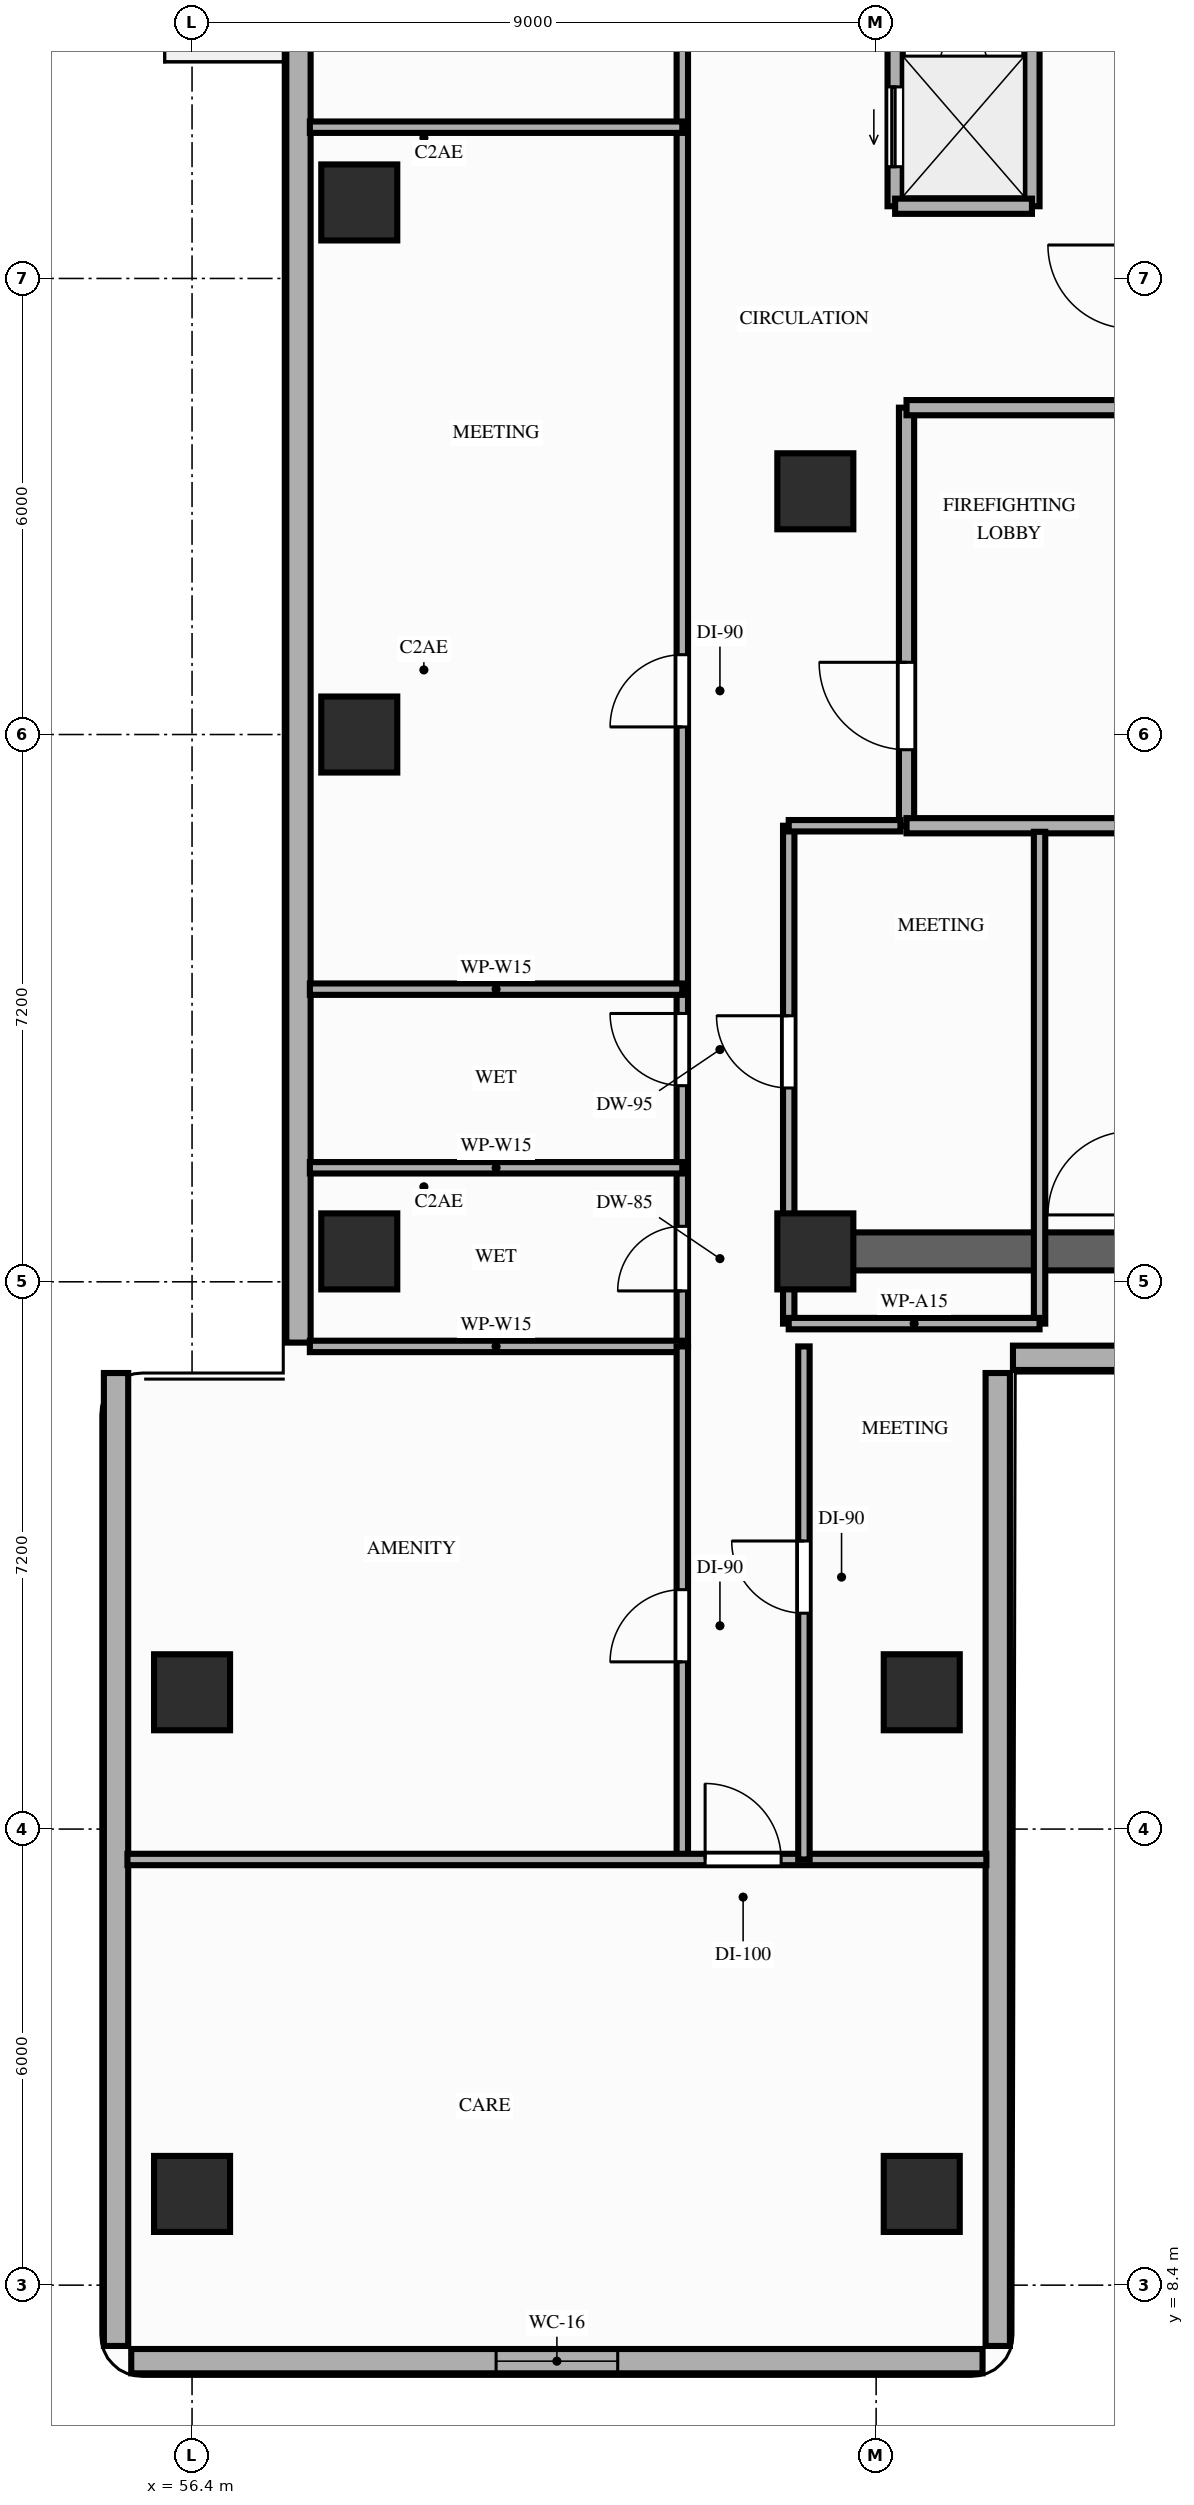
"""IFC4 building model, lengths in metres.
Left out: names, types, materials, properties, quantities, classifications, styles, units other than length and angle.
Written with IfcOpenShell. Run it as: python <this file> out.ifc"""

import sys

from ifc_helpers import new_model, si_unit, direction, frame, frame_2d, origin, origin_2d, place, context, subcontext, project, spatial, rectangle, extrude, element, fill, save


model = new_model("IFC4")
c1 = context("Model", 3, precision=1e-05, world=origin(), true_north=direction((0.0, 1.0)))
c2 = subcontext(c1, "Body", "Model", "MODEL_VIEW")
j1 = project(units=[si_unit("LENGTHUNIT", "METRE"), si_unit("PLANEANGLEUNIT", "RADIAN")], contexts=[c1])
p1 = place(None, origin())
s1 = spatial("IfcSite", under=j1, at=p1, CompositionType="ELEMENT")
p2 = place(p1, origin())
s2 = spatial("IfcBuilding", under=s1, at=p2, CompositionType="ELEMENT")
p3 = place(p2, frame((0.0, 0.0, 30.2)))
s3 = spatial("IfcBuildingStorey", under=s2, at=p3, CompositionType="ELEMENT", Elevation=30.2)
for number, where, z_axis, x_axis in (
    (1, (64.6, 22.0, 0.0), (0.0, 0.0, 1.0), (1.0, 0.0, 0.0)),
    (2, (64.6, 32.0, 0.0), (0.0, 0.0, 1.0), (1.0, 0.0, 0.0)),
    (3, (58.6, 22.0, 0.0), (0.0, 0.0, 1.0), (1.0, 0.0, 0.0)),
    (4, (58.6, 28.8, 0.0), (0.0, 0.0, 1.0), (1.0, 0.0, 0.0)),
    (5, (58.6, 35.8, 0.0), (0.0, 0.0, 1.0), (1.0, 0.0, 0.0)),
    (6, (56.4, 9.6, 0.0), (0.0, 0.0, 1.0), (1.0, 0.0, 0.0)),
    (7, (56.4, 16.2, 0.0), (0.0, 0.0, 1.0), (1.0, 0.0, 0.0)),
    (8, (66.0, 9.6, 0.0), (0.0, 0.0, 1.0), (1.0, 0.0, 0.0)),
    (9, (66.0, 16.2, 0.0), (0.0, 0.0, 1.0), (1.0, 0.0, 0.0)),
):
    element("IfcColumn", number, at=place(p3, frame(where, z_axis=z_axis, x_axis=x_axis)), inside=s3, PredefinedType="COLUMN", context=c2, shape_type="SweptSolid", body=[
        extrude(rectangle(XDim=1.0, YDim=1.0, at=origin_2d()), origin(), (0.0, 0.0, 1.0), 3.2),
    ])
p4 = place(p3, frame((57.8, 43.4, 0.0), z_axis=(0.0, 0.0, 1.0), x_axis=(0.0, -1.0, 0.0)))
e10 = element("IfcWall", 10, at=p4, inside=s3, PredefinedType="STANDARD", context=c2, shape_type="SweptSolid", body=[
    extrude(rectangle(XDim=22.6, YDim=0.32, at=frame_2d((11.3, 0.0))), origin(), (0.0, 0.0, 1.0), 2.5),
])
p5 = place(p4, frame((3.7, 0.0, 0.0)))
e11 = element("IfcOpeningElement", 11, at=p5, cuts=e10, PredefinedType="OPENING", context=c2, shape_type="SweptSolid", body=[
    extrude(rectangle(XDim=1.4, YDim=2.1, at=frame_2d((0.7, 1.05))), frame((0.0, 0.17, 0.0), z_axis=(0.0, -1.0, 0.0), x_axis=(1.0, 0.0, 0.0)), (0.0, 0.0, 1.0), 0.34),
])
p6 = place(p3, frame((55.6, 7.4, 0.0), z_axis=(0.0, 0.0, 1.0), x_axis=(1.0, 0.0, 0.0)))
e12 = element("IfcWall", 12, at=p6, inside=s3, PredefinedType="STANDARD", context=c2, shape_type="SweptSolid", body=[
    extrude(rectangle(XDim=11.2, YDim=0.32, at=frame_2d((5.6, 0.0))), origin(), (0.0, 0.0, 1.0), 3.02),
])
p7 = place(p6, frame((4.8, 0.0, 0.85)))
e13 = element("IfcOpeningElement", 13, at=p7, cuts=e12, PredefinedType="OPENING", context=c2, shape_type="SweptSolid", body=[
    extrude(rectangle(XDim=1.6, YDim=1.7, at=frame_2d((0.8, 0.85))), frame((0.0, 0.17, 0.0), z_axis=(0.0, -1.0, 0.0), x_axis=(1.0, 0.0, 0.0)), (0.0, 0.0, 1.0), 0.34),
])
for number, where, z_axis, x_axis in (
    (14, (55.4, 20.4, 0.0), (0.0, 0.0, 1.0), (0.0, -1.0, 0.0)),
    (15, (67.0, 7.6, 0.0), (0.0, 0.0, 1.0), (0.0, 1.0, 0.0)),
):
    element("IfcWall", number, at=place(p3, frame(where, z_axis=z_axis, x_axis=x_axis)), inside=s3, PredefinedType="STANDARD", context=c2, shape_type="SweptSolid", body=[
        extrude(rectangle(XDim=12.8, YDim=0.32, at=frame_2d((6.4, 0.0))), origin(), (0.0, 0.0, 1.0), 3.02),
    ])
p8 = place(p3, frame((67.2, 20.6, 0.0), z_axis=(0.0, 0.0, 1.0), x_axis=(1.0, 0.0, 0.0)))
e16 = element("IfcWall", 16, at=p8, inside=s3, PredefinedType="STANDARD", context=c2, shape_type="SweptSolid", body=[
    extrude(rectangle(XDim=5.6, YDim=0.32, at=frame_2d((2.8, 0.0))), origin(), (0.0, 0.0, 1.0), 3.02),
])
p9 = place(p3, frame((64.6, 22.0, 0.0), z_axis=(0.0, 0.0, 1.0), x_axis=(1.0, 0.0, 0.0)))
e17 = element("IfcWall", 17, at=p9, inside=s3, PredefinedType="SHEAR", context=c2, shape_type="SweptSolid", body=[
    extrude(rectangle(XDim=7.5, YDim=0.5, at=frame_2d((3.75, 0.0))), origin(), (0.0, 0.0, 1.0), 3.02),
])
p10 = place(p3, frame((65.65, 35.75, 0.0), z_axis=(0.0, 0.0, 1.0), x_axis=(0.0, 1.0, 0.0)))
e18 = element("IfcWall", 18, at=p10, inside=s3, PredefinedType="MOVABLE", context=c2, shape_type="SweptSolid", body=[
    extrude(rectangle(XDim=6.05, YDim=0.2, at=frame_2d((3.025, 0.0))), origin(), (0.0, 0.0, 1.0), 3.02),
])
p11 = place(p10, frame((0.52, 0.0, 0.0)))
e19 = element("IfcOpeningElement", 19, at=p11, cuts=e18, PredefinedType="OPENING", context=c2, shape_type="SweptSolid", body=[
    extrude(rectangle(XDim=1.05, YDim=2.15, at=frame_2d((0.525, 1.075))), frame((0.0, 0.11, 0.0), z_axis=(0.0, -1.0, 0.0), x_axis=(1.0, 0.0, 0.0)), (0.0, 0.0, 1.0), 0.22),
])
p12 = place(p10, frame((2.48, 0.0, 0.0)))
e20 = element("IfcOpeningElement", 20, at=p12, cuts=e18, PredefinedType="OPENING", context=c2, shape_type="SweptSolid", body=[
    extrude(rectangle(XDim=1.05, YDim=2.15, at=frame_2d((0.525, 1.075))), frame((0.0, 0.11, 0.0), z_axis=(0.0, -1.0, 0.0), x_axis=(1.0, 0.0, 0.0)), (0.0, 0.0, 1.0), 0.22),
])
p13 = place(p10, frame((4.43, 0.0, 0.0)))
e21 = element("IfcOpeningElement", 21, at=p13, cuts=e18, PredefinedType="OPENING", context=c2, shape_type="SweptSolid", body=[
    extrude(rectangle(XDim=1.05, YDim=2.15, at=frame_2d((0.525, 1.075))), frame((0.0, 0.11, 0.0), z_axis=(0.0, -1.0, 0.0), x_axis=(1.0, 0.0, 0.0)), (0.0, 0.0, 1.0), 0.22),
])
p14 = place(p3, frame((67.45, 35.75, 0.0), z_axis=(0.0, 0.0, 1.0), x_axis=(0.0, 1.0, 0.0)))
e22 = element("IfcWall", 22, at=p14, inside=s3, PredefinedType="MOVABLE", context=c2, shape_type="SweptSolid", body=[
    extrude(rectangle(XDim=6.05, YDim=0.2, at=frame_2d((3.025, 0.0))), origin(), (0.0, 0.0, 1.0), 3.02),
])
p15 = place(p3, frame((65.65, 35.75, 0.0), z_axis=(0.0, 0.0, 1.0), x_axis=(1.0, 0.0, 0.0)))
e23 = element("IfcWall", 23, at=p15, inside=s3, PredefinedType="MOVABLE", context=c2, shape_type="SweptSolid", body=[
    extrude(rectangle(XDim=1.8, YDim=0.2, at=frame_2d((0.9, 0.0))), origin(), (0.0, 0.0, 1.0), 3.02),
])
p16 = place(p3, frame((65.8, 27.6, 0.0), z_axis=(0.0, 0.0, 1.0), x_axis=(0.0, 1.0, 0.0)))
e24 = element("IfcWall", 24, at=p16, inside=s3, PredefinedType="PARTITIONING", context=c2, shape_type="SweptSolid", body=[
    extrude(rectangle(XDim=5.5, YDim=0.2, at=frame_2d((2.75, 0.0))), origin(), (0.0, 0.0, 1.0), 3.02),
])
p17 = place(p16, frame((1.0, 0.0, 0.0)))
e25 = element("IfcOpeningElement", 25, at=p17, cuts=e24, PredefinedType="OPENING", context=c2, shape_type="SweptSolid", body=[
    extrude(rectangle(XDim=1.15, YDim=2.15, at=frame_2d((0.575, 1.075))), frame((0.0, 0.11, 0.0), z_axis=(0.0, -1.0, 0.0), x_axis=(1.0, 0.0, 0.0)), (0.0, 0.0, 1.0), 0.22),
])
p18 = place(p3, frame((65.8, 33.1, 0.0), z_axis=(0.0, 0.0, 1.0), x_axis=(1.0, 0.0, 0.0)))
e26 = element("IfcWall", 26, at=p18, inside=s3, PredefinedType="PARTITIONING", context=c2, shape_type="SweptSolid", body=[
    extrude(rectangle(XDim=3.6, YDim=0.2, at=frame_2d((1.8, 0.0))), origin(), (0.0, 0.0, 1.0), 3.02),
])
p19 = place(p3, frame((65.8, 27.6, 0.0), z_axis=(0.0, 0.0, 1.0), x_axis=(1.0, 0.0, 0.0)))
e27 = element("IfcWall", 27, at=p19, inside=s3, PredefinedType="PARTITIONING", context=c2, shape_type="SweptSolid", body=[
    extrude(rectangle(XDim=3.4, YDim=0.2, at=frame_2d((1.7, 0.0))), origin(), (0.0, 0.0, 1.0), 3.02),
])
p20 = place(p3, frame((64.25, 21.05, 0.0), z_axis=(0.0, 0.0, 1.0), x_axis=(0.0, 1.0, 0.0)))
e28 = element("IfcWall", 28, at=p20, inside=s3, PredefinedType="PARTITIONING", context=c2, shape_type="SweptSolid", body=[
    extrude(rectangle(XDim=6.55, YDim=0.15, at=frame_2d((3.275, 0.0))), origin(), (0.0, 0.0, 1.0), 2.5),
])
p21 = place(p20, frame((3.1, 0.0, 0.0)))
e29 = element("IfcOpeningElement", 29, at=p21, cuts=e28, PredefinedType="OPENING", context=c2, shape_type="SweptSolid", body=[
    extrude(rectangle(XDim=0.95, YDim=2.15, at=frame_2d((0.475, 1.075))), frame((0.0, 0.085, 0.0), z_axis=(0.0, -1.0, 0.0), x_axis=(1.0, 0.0, 0.0)), (0.0, 0.0, 1.0), 0.17),
])
p22 = place(p3, frame((67.55, 21.05, 0.0), z_axis=(0.0, 0.0, 1.0), x_axis=(0.0, 1.0, 0.0)))
e30 = element("IfcWall", 30, at=p22, inside=s3, PredefinedType="PARTITIONING", context=c2, shape_type="SweptSolid", body=[
    extrude(rectangle(XDim=6.47, YDim=0.15, at=frame_2d((3.235, 0.0))), origin(), (0.0, 0.0, 1.0), 2.5),
])
p23 = place(p3, frame((64.25, 21.05, 0.0), z_axis=(0.0, 0.0, 1.0), x_axis=(1.0, 0.0, 0.0)))
e31 = element("IfcWall", 31, at=p23, inside=s3, PredefinedType="PARTITIONING", context=c2, shape_type="SweptSolid", body=[
    extrude(rectangle(XDim=3.3, YDim=0.15, at=frame_2d((1.65, 0.0))), origin(), (0.0, 0.0, 1.0), 2.5),
])
p24 = place(p3, frame((64.25, 27.6, 0.0), z_axis=(0.0, 0.0, 1.0), x_axis=(1.0, 0.0, 0.0)))
e32 = element("IfcWall", 32, at=p24, inside=s3, PredefinedType="PARTITIONING", context=c2, shape_type="SweptSolid", body=[
    extrude(rectangle(XDim=1.47, YDim=0.15, at=frame_2d((0.735, 0.0))), origin(), (0.0, 0.0, 1.0), 2.5),
])
p25 = place(p3, frame((62.85, 20.75, 0.0), z_axis=(0.0, 0.0, 1.0), x_axis=(0.0, 1.0, 0.0)))
e33 = element("IfcWall", 33, at=p25, inside=s3, PredefinedType="PARTITIONING", context=c2, shape_type="SweptSolid", body=[
    extrude(rectangle(XDim=22.7, YDim=0.15, at=frame_2d((11.35, 0.0))), origin(), (0.0, 0.0, 1.0), 2.5),
])
p26 = place(p25, frame((0.73, 0.0, 0.0)))
e34 = element("IfcOpeningElement", 34, at=p26, cuts=e33, PredefinedType="OPENING", context=c2, shape_type="SweptSolid", body=[
    extrude(rectangle(XDim=0.85, YDim=2.1, at=frame_2d((0.425, 1.05))), frame((0.0, 0.085, 0.0), z_axis=(0.0, -1.0, 0.0), x_axis=(1.0, 0.0, 0.0)), (0.0, 0.0, 1.0), 0.17),
])
p27 = place(p25, frame((3.43, 0.0, 0.0)))
e35 = element("IfcOpeningElement", 35, at=p27, cuts=e33, PredefinedType="OPENING", context=c2, shape_type="SweptSolid", body=[
    extrude(rectangle(XDim=0.95, YDim=2.1, at=frame_2d((0.475, 1.05))), frame((0.0, 0.085, 0.0), z_axis=(0.0, -1.0, 0.0), x_axis=(1.0, 0.0, 0.0)), (0.0, 0.0, 1.0), 0.17),
])
p28 = place(p25, frame((8.15, 0.0, 0.0)))
e36 = element("IfcOpeningElement", 36, at=p28, cuts=e33, PredefinedType="OPENING", context=c2, shape_type="SweptSolid", body=[
    extrude(rectangle(XDim=0.95, YDim=2.15, at=frame_2d((0.475, 1.075))), frame((0.0, 0.085, 0.0), z_axis=(0.0, -1.0, 0.0), x_axis=(1.0, 0.0, 0.0)), (0.0, 0.0, 1.0), 0.17),
])
p29 = place(p25, frame((18.89, 0.0, 0.0)))
e37 = element("IfcOpeningElement", 37, at=p29, cuts=e33, PredefinedType="OPENING", context=c2, shape_type="SweptSolid", body=[
    extrude(rectangle(XDim=0.95, YDim=2.15, at=frame_2d((0.475, 1.075))), frame((0.0, 0.085, 0.0), z_axis=(0.0, -1.0, 0.0), x_axis=(1.0, 0.0, 0.0)), (0.0, 0.0, 1.0), 0.17),
])
for number, where, z_axis, x_axis in (
    (38, (57.95, 20.75, 0.0), (0.0, 0.0, 1.0), (1.0, 0.0, 0.0)),
    (39, (57.95, 23.1, 0.0), (0.0, 0.0, 1.0), (1.0, 0.0, 0.0)),
    (40, (57.95, 25.45, 0.0), (0.0, 0.0, 1.0), (1.0, 0.0, 0.0)),
    (41, (57.95, 36.79, 0.0), (0.0, 0.0, 1.0), (1.0, 0.0, 0.0)),
):
    element("IfcWall", number, at=place(p3, frame(where, z_axis=z_axis, x_axis=x_axis)), inside=s3, PredefinedType="PARTITIONING", context=c2, shape_type="SweptSolid", body=[
        extrude(rectangle(XDim=4.9, YDim=0.15, at=frame_2d((2.45, 0.0))), origin(), (0.0, 0.0, 1.0), 2.5),
    ])
p30 = place(p3, frame((62.85, 14.0, 0.0), z_axis=(0.0, 0.0, 1.0), x_axis=(0.0, 1.0, 0.0)))
e42 = element("IfcWall", 42, at=p30, inside=s3, PredefinedType="PARTITIONING", context=c2, shape_type="SweptSolid", body=[
    extrude(rectangle(XDim=6.75, YDim=0.15, at=frame_2d((3.375, 0.0))), origin(), (0.0, 0.0, 1.0), 2.5),
])
p31 = place(p30, frame((2.6, 0.0, 0.0)))
e43 = element("IfcOpeningElement", 43, at=p31, cuts=e42, PredefinedType="OPENING", context=c2, shape_type="SweptSolid", body=[
    extrude(rectangle(XDim=0.95, YDim=2.15, at=frame_2d((0.475, 1.075))), frame((0.0, 0.085, 0.0), z_axis=(0.0, -1.0, 0.0), x_axis=(1.0, 0.0, 0.0)), (0.0, 0.0, 1.0), 0.17),
])
p32 = place(p3, frame((55.55, 14.0, 0.0), z_axis=(0.0, 0.0, 1.0), x_axis=(1.0, 0.0, 0.0)))
e44 = element("IfcWall", 44, at=p32, inside=s3, PredefinedType="PARTITIONING", context=c2, shape_type="SweptSolid", body=[
    extrude(rectangle(XDim=11.3, YDim=0.15, at=frame_2d((5.65, 0.0))), origin(), (0.0, 0.0, 1.0), 2.5),
])
p33 = place(p32, frame((7.6, 0.0, 0.0)))
e45 = element("IfcOpeningElement", 45, at=p33, cuts=e44, PredefinedType="OPENING", context=c2, shape_type="SweptSolid", body=[
    extrude(rectangle(XDim=1.0, YDim=2.15, at=frame_2d((0.5, 1.075))), frame((0.0, 0.085, 0.0), z_axis=(0.0, -1.0, 0.0), x_axis=(1.0, 0.0, 0.0)), (0.0, 0.0, 1.0), 0.17),
])
p34 = place(p3, frame((64.45, 14.0, 0.0), z_axis=(0.0, 0.0, 1.0), x_axis=(0.0, 1.0, 0.0)))
e46 = element("IfcWall", 46, at=p34, inside=s3, PredefinedType="PARTITIONING", context=c2, shape_type="SweptSolid", body=[
    extrude(rectangle(XDim=6.75, YDim=0.15, at=frame_2d((3.375, 0.0))), origin(), (0.0, 0.0, 1.0), 2.5),
])
p35 = place(p34, frame((3.24, 0.0, 0.0)))
e47 = element("IfcOpeningElement", 47, at=p35, cuts=e46, PredefinedType="OPENING", context=c2, shape_type="SweptSolid", body=[
    extrude(rectangle(XDim=0.95, YDim=2.15, at=frame_2d((0.475, 1.075))), frame((0.0, 0.085, 0.0), z_axis=(0.0, -1.0, 0.0), x_axis=(1.0, 0.0, 0.0)), (0.0, 0.0, 1.0), 0.17),
])
p36 = place(p7, origin())
e48 = element("IfcWindow", 48, at=p36, inside=s3, PartitioningType="SINGLE_PANEL", PredefinedType="WINDOW", context=c2, shape_type="SweptSolid", body=[
    extrude(rectangle(XDim=1.6, YDim=1.7, at=frame_2d((0.8, 0.85))), frame((0.0, 0.03, 0.0), z_axis=(0.0, -1.0, 0.0), x_axis=(1.0, 0.0, 0.0)), (0.0, 0.0, 1.0), 0.06),
])
fill(e13, e48)
p37 = place(p11, origin())
e49 = element("IfcDoor", 49, at=p37, inside=s3, OperationType="SLIDING_TO_LEFT", PredefinedType="DOOR", context=c2, shape_type="SweptSolid", body=[
    extrude(rectangle(XDim=1.05, YDim=2.15, at=frame_2d((0.525, 1.075))), frame((0.0, 0.025, 0.0), z_axis=(0.0, -1.0, 0.0), x_axis=(1.0, 0.0, 0.0)), (0.0, 0.0, 1.0), 0.05),
])
fill(e19, e49)
p38 = place(p17, origin())
e50 = element("IfcDoor", 50, at=p38, inside=s3, OperationType="SINGLE_SWING_RIGHT", PredefinedType="DOOR", context=c2, shape_type="SweptSolid", body=[
    extrude(rectangle(XDim=1.15, YDim=2.15, at=frame_2d((0.575, 1.075))), frame((0.0, 0.025, 0.0), z_axis=(0.0, -1.0, 0.0), x_axis=(1.0, 0.0, 0.0)), (0.0, 0.0, 1.0), 0.05),
])
fill(e25, e50)
p39 = place(p21, origin())
e51 = element("IfcDoor", 51, at=p39, inside=s3, OperationType="SINGLE_SWING_RIGHT", PredefinedType="DOOR", context=c2, shape_type="SweptSolid", body=[
    extrude(rectangle(XDim=0.95, YDim=2.15, at=frame_2d((0.475, 1.075))), frame((0.0, 0.025, 0.0), z_axis=(0.0, -1.0, 0.0), x_axis=(1.0, 0.0, 0.0)), (0.0, 0.0, 1.0), 0.05),
])
fill(e29, e51)
p40 = place(p26, origin())
e52 = element("IfcDoor", 52, at=p40, inside=s3, OperationType="SINGLE_SWING_LEFT", PredefinedType="DOOR", context=c2, shape_type="SweptSolid", body=[
    extrude(rectangle(XDim=0.85, YDim=2.1, at=frame_2d((0.425, 1.05))), frame((0.0, 0.025, 0.0), z_axis=(0.0, -1.0, 0.0), x_axis=(1.0, 0.0, 0.0)), (0.0, 0.0, 1.0), 0.05),
])
fill(e34, e52)
p41 = place(p27, origin())
e53 = element("IfcDoor", 53, at=p41, inside=s3, OperationType="SINGLE_SWING_RIGHT", PredefinedType="DOOR", context=c2, shape_type="SweptSolid", body=[
    extrude(rectangle(XDim=0.95, YDim=2.1, at=frame_2d((0.475, 1.05))), frame((0.0, 0.025, 0.0), z_axis=(0.0, -1.0, 0.0), x_axis=(1.0, 0.0, 0.0)), (0.0, 0.0, 1.0), 0.05),
])
fill(e35, e53)
p42 = place(p28, origin())
e54 = element("IfcDoor", 54, at=p42, inside=s3, OperationType="SINGLE_SWING_LEFT", PredefinedType="DOOR", context=c2, shape_type="SweptSolid", body=[
    extrude(rectangle(XDim=0.95, YDim=2.15, at=frame_2d((0.475, 1.075))), frame((0.0, 0.025, 0.0), z_axis=(0.0, -1.0, 0.0), x_axis=(1.0, 0.0, 0.0)), (0.0, 0.0, 1.0), 0.05),
])
fill(e36, e54)
p43 = place(p31, origin())
e55 = element("IfcDoor", 55, at=p43, inside=s3, OperationType="SINGLE_SWING_LEFT", PredefinedType="DOOR", context=c2, shape_type="SweptSolid", body=[
    extrude(rectangle(XDim=0.95, YDim=2.15, at=frame_2d((0.475, 1.075))), frame((0.0, 0.025, 0.0), z_axis=(0.0, -1.0, 0.0), x_axis=(1.0, 0.0, 0.0)), (0.0, 0.0, 1.0), 0.05),
])
fill(e43, e55)
p44 = place(p35, origin())
e56 = element("IfcDoor", 56, at=p44, inside=s3, OperationType="SINGLE_SWING_RIGHT", PredefinedType="DOOR", context=c2, shape_type="SweptSolid", body=[
    extrude(rectangle(XDim=0.95, YDim=2.15, at=frame_2d((0.475, 1.075))), frame((0.0, 0.025, 0.0), z_axis=(0.0, -1.0, 0.0), x_axis=(1.0, 0.0, 0.0)), (0.0, 0.0, 1.0), 0.05),
])
fill(e47, e56)
p45 = place(p33, origin())
e57 = element("IfcDoor", 57, at=p45, inside=s3, OperationType="SINGLE_SWING_LEFT", PredefinedType="DOOR", context=c2, shape_type="SweptSolid", body=[
    extrude(rectangle(XDim=1.0, YDim=2.15, at=frame_2d((0.5, 1.075))), frame((0.0, 0.025, 0.0), z_axis=(0.0, -1.0, 0.0), x_axis=(1.0, 0.0, 0.0)), (0.0, 0.0, 1.0), 0.05),
])
fill(e45, e57)
save(model, sys.argv[1])
